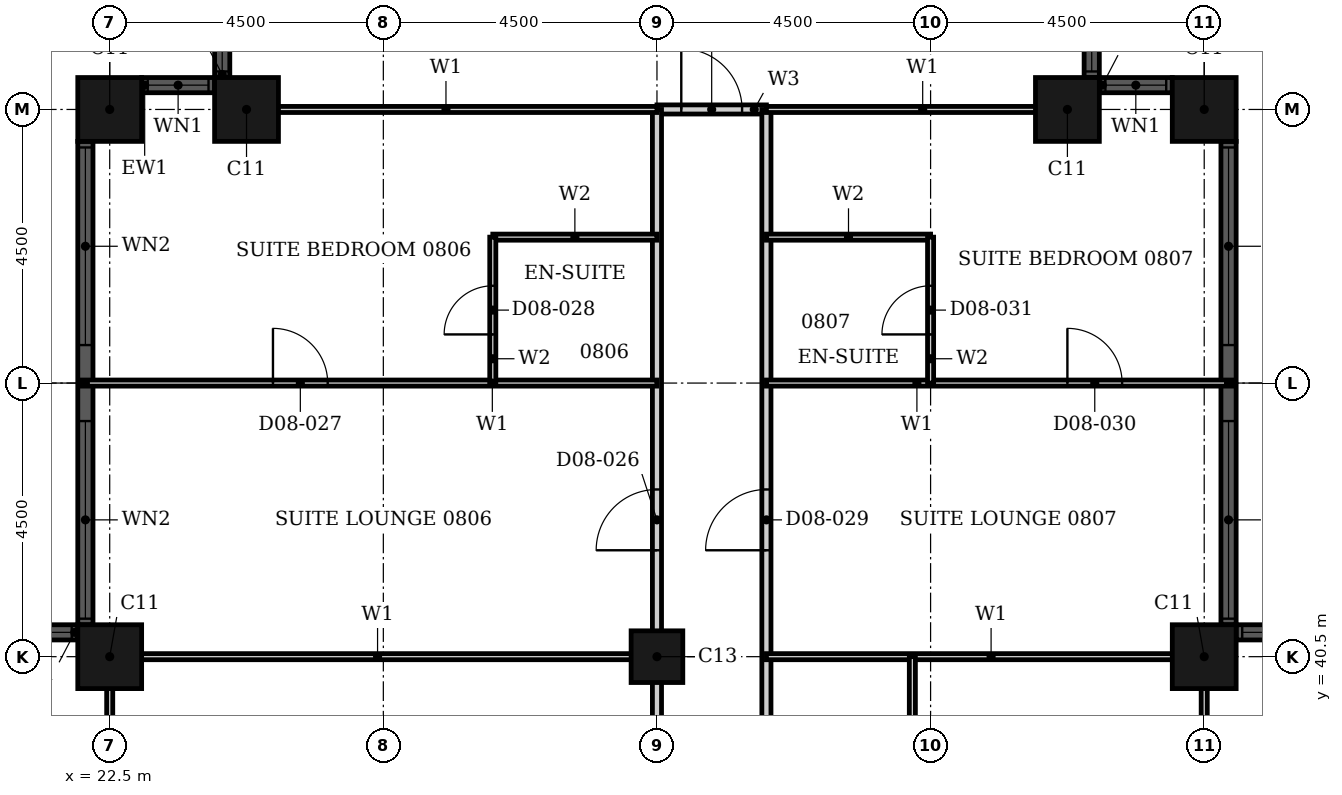
"""IFC4 building model, lengths in metres.
Left out: names, types, materials, properties, quantities, classifications, styles, units other than length and angle.
Written with IfcOpenShell. Run it as: python <this file> out.ifc"""

import sys

from ifc_helpers import new_model, si_unit, direction, frame, frame_2d, origin, origin_2d, place, context, subcontext, project, spatial, rectangle, hollow_rectangle, extrude, element, fill, save


model = new_model("IFC4")
c1 = context("Model", 3, precision=1e-05, world=origin(), true_north=direction((0.0, 1.0)))
c2 = subcontext(c1, "Body", "Model", "MODEL_VIEW")
j1 = project(units=[si_unit("LENGTHUNIT", "METRE"), si_unit("PLANEANGLEUNIT", "RADIAN")], contexts=[c1])
p1 = place(None, origin())
s1 = spatial("IfcSite", under=j1, at=p1, CompositionType="ELEMENT")
p2 = place(p1, origin())
s2 = spatial("IfcBuilding", under=s1, at=p2, CompositionType="ELEMENT")
p3 = place(p2, frame((0.0, 0.0, 40.8)))
s3 = spatial("IfcBuildingStorey", under=s2, at=p3, CompositionType="ELEMENT", Elevation=40.8)
for number, where, z_axis, x_axis in (
    (1, (40.5, 40.5, 0.0), (0.0, 0.0, 1.0), (1.0, 0.0, 0.0)),
    (2, (40.5, 49.5, 0.0), (0.0, 0.0, 1.0), (1.0, 0.0, 0.0)),
    (3, (38.25, 49.5, 0.0), (0.0, 0.0, 1.0), (1.0, 0.0, 0.0)),
    (4, (24.75, 49.5, 0.0), (0.0, 0.0, 1.0), (1.0, 0.0, 0.0)),
    (5, (22.5, 49.5, 0.0), (0.0, 0.0, 1.0), (1.0, 0.0, 0.0)),
    (6, (22.5, 40.5, 0.0), (0.0, 0.0, 1.0), (1.0, 0.0, 0.0)),
):
    element("IfcColumn", number, at=place(p3, frame(where, z_axis=z_axis, x_axis=x_axis)), inside=s3, PredefinedType="COLUMN", context=c2, shape_type="SweptSolid", body=[
        extrude(hollow_rectangle(XDim=1.05, YDim=1.05, WallThickness=0.034, at=origin_2d()), origin(), (0.0, 0.0, 1.0), 3.6),
    ])
p4 = place(p3, frame((31.5, 40.5, 0.0), z_axis=(0.0, 0.0, 1.0), x_axis=(1.0, 0.0, 0.0)))
e7 = element("IfcColumn", 7, at=p4, inside=s3, PredefinedType="COLUMN", context=c2, shape_type="SweptSolid", body=[
    extrude(hollow_rectangle(XDim=0.85, YDim=0.85, WallThickness=0.026, at=origin_2d()), origin(), (0.0, 0.0, 1.0), 3.6),
])
p5 = place(p3, frame((44.475, 40.9, 0.0), z_axis=(0.0, 0.0, 1.0), x_axis=(-1.0, 0.0, 0.0)))
e8 = element("IfcWall", 8, at=p5, inside=s3, PredefinedType="SOLIDWALL", context=c2, shape_type="SweptSolid", body=[
    extrude(rectangle(XDim=3.45, YDim=0.25, at=frame_2d((1.725, 0.0))), origin(), (0.0, 0.0, 1.0), 3.6),
])
p6 = place(p5, frame((0.1, 0.0, 0.9)))
e9 = element("IfcOpeningElement", 9, at=p6, cuts=e8, PredefinedType="OPENING", context=c2, shape_type="SweptSolid", body=[
    extrude(rectangle(XDim=3.25, YDim=2.08, at=frame_2d((1.625, 1.04))), frame((0.0, 0.135, 0.0), z_axis=(0.0, -1.0, 0.0), x_axis=(1.0, 0.0, 0.0)), (0.0, 0.0, 1.0), 0.27),
])
p7 = place(p3, frame((40.9, 41.025, 0.0), z_axis=(0.0, 0.0, 1.0), x_axis=(0.0, 1.0, 0.0)))
e10 = element("IfcWall", 10, at=p7, inside=s3, PredefinedType="SOLIDWALL", context=c2, shape_type="SweptSolid", body=[
    extrude(rectangle(XDim=7.95, YDim=0.25, at=frame_2d((3.975, 0.0))), origin(), (0.0, 0.0, 1.0), 3.6),
])
p8 = place(p7, frame((0.1, 0.0, 0.9)))
e11 = element("IfcOpeningElement", 11, at=p8, cuts=e10, PredefinedType="OPENING", context=c2, shape_type="SweptSolid", body=[
    extrude(rectangle(XDim=3.25, YDim=2.08, at=frame_2d((1.625, 1.04))), frame((0.0, 0.135, 0.0), z_axis=(0.0, -1.0, 0.0), x_axis=(1.0, 0.0, 0.0)), (0.0, 0.0, 1.0), 0.27),
])
p9 = place(p7, frame((4.6, 0.0, 0.9)))
e12 = element("IfcOpeningElement", 12, at=p9, cuts=e10, PredefinedType="OPENING", context=c2, shape_type="SweptSolid", body=[
    extrude(rectangle(XDim=3.25, YDim=2.08, at=frame_2d((1.625, 1.04))), frame((0.0, 0.135, 0.0), z_axis=(0.0, -1.0, 0.0), x_axis=(1.0, 0.0, 0.0)), (0.0, 0.0, 1.0), 0.27),
])
p10 = place(p3, frame((39.975, 49.9, 0.0), z_axis=(0.0, 0.0, 1.0), x_axis=(-1.0, 0.0, 0.0)))
e13 = element("IfcWall", 13, at=p10, inside=s3, PredefinedType="SOLIDWALL", context=c2, shape_type="SweptSolid", body=[
    extrude(rectangle(XDim=1.2, YDim=0.25, at=frame_2d((0.6, 0.0))), origin(), (0.0, 0.0, 1.0), 3.6),
])
p11 = place(p10, frame((0.1, 0.0, 0.9)))
e14 = element("IfcOpeningElement", 14, at=p11, cuts=e13, PredefinedType="OPENING", context=c2, shape_type="SweptSolid", body=[
    extrude(rectangle(XDim=1.0, YDim=2.08, at=frame_2d((0.5, 1.04))), frame((0.0, 0.135, 0.0), z_axis=(0.0, -1.0, 0.0), x_axis=(1.0, 0.0, 0.0)), (0.0, 0.0, 1.0), 0.27),
])
p12 = place(p3, frame((38.65, 50.025, 0.0), z_axis=(0.0, 0.0, 1.0), x_axis=(0.0, 1.0, 0.0)))
e15 = element("IfcWall", 15, at=p12, inside=s3, PredefinedType="SOLIDWALL", context=c2, shape_type="SweptSolid", body=[
    extrude(rectangle(XDim=1.2, YDim=0.25, at=frame_2d((0.6, 0.0))), origin(), (0.0, 0.0, 1.0), 3.6),
])
p13 = place(p12, frame((0.1, 0.0, 0.9)))
e16 = element("IfcOpeningElement", 16, at=p13, cuts=e15, PredefinedType="OPENING", context=c2, shape_type="SweptSolid", body=[
    extrude(rectangle(XDim=1.0, YDim=2.08, at=frame_2d((0.5, 1.04))), frame((0.0, 0.135, 0.0), z_axis=(0.0, -1.0, 0.0), x_axis=(1.0, 0.0, 0.0)), (0.0, 0.0, 1.0), 0.27),
])
p14 = place(p3, frame((24.35, 51.225, 0.0), z_axis=(0.0, 0.0, 1.0), x_axis=(0.0, -1.0, 0.0)))
e17 = element("IfcWall", 17, at=p14, inside=s3, PredefinedType="SOLIDWALL", context=c2, shape_type="SweptSolid", body=[
    extrude(rectangle(XDim=1.2, YDim=0.25, at=frame_2d((0.6, 0.0))), origin(), (0.0, 0.0, 1.0), 3.6),
])
p15 = place(p14, frame((0.1, 0.0, 0.9)))
e18 = element("IfcOpeningElement", 18, at=p15, cuts=e17, PredefinedType="OPENING", context=c2, shape_type="SweptSolid", body=[
    extrude(rectangle(XDim=1.0, YDim=2.08, at=frame_2d((0.5, 1.04))), frame((0.0, 0.135, 0.0), z_axis=(0.0, -1.0, 0.0), x_axis=(1.0, 0.0, 0.0)), (0.0, 0.0, 1.0), 0.27),
])
p16 = place(p3, frame((24.225, 49.9, 0.0), z_axis=(0.0, 0.0, 1.0), x_axis=(-1.0, 0.0, 0.0)))
e19 = element("IfcWall", 19, at=p16, inside=s3, PredefinedType="SOLIDWALL", context=c2, shape_type="SweptSolid", body=[
    extrude(rectangle(XDim=1.2, YDim=0.25, at=frame_2d((0.6, 0.0))), origin(), (0.0, 0.0, 1.0), 3.6),
])
p17 = place(p16, frame((0.1, 0.0, 0.9)))
e20 = element("IfcOpeningElement", 20, at=p17, cuts=e19, PredefinedType="OPENING", context=c2, shape_type="SweptSolid", body=[
    extrude(rectangle(XDim=1.0, YDim=2.08, at=frame_2d((0.5, 1.04))), frame((0.0, 0.135, 0.0), z_axis=(0.0, -1.0, 0.0), x_axis=(1.0, 0.0, 0.0)), (0.0, 0.0, 1.0), 0.27),
])
p18 = place(p3, frame((22.1, 48.975, 0.0), z_axis=(0.0, 0.0, 1.0), x_axis=(0.0, -1.0, 0.0)))
e21 = element("IfcWall", 21, at=p18, inside=s3, PredefinedType="SOLIDWALL", context=c2, shape_type="SweptSolid", body=[
    extrude(rectangle(XDim=7.95, YDim=0.25, at=frame_2d((3.975, 0.0))), origin(), (0.0, 0.0, 1.0), 3.6),
])
p19 = place(p18, frame((0.1, 0.0, 0.9)))
e22 = element("IfcOpeningElement", 22, at=p19, cuts=e21, PredefinedType="OPENING", context=c2, shape_type="SweptSolid", body=[
    extrude(rectangle(XDim=3.25, YDim=2.08, at=frame_2d((1.625, 1.04))), frame((0.0, 0.135, 0.0), z_axis=(0.0, -1.0, 0.0), x_axis=(1.0, 0.0, 0.0)), (0.0, 0.0, 1.0), 0.27),
])
p20 = place(p18, frame((4.6, 0.0, 0.9)))
e23 = element("IfcOpeningElement", 23, at=p20, cuts=e21, PredefinedType="OPENING", context=c2, shape_type="SweptSolid", body=[
    extrude(rectangle(XDim=3.25, YDim=2.08, at=frame_2d((1.625, 1.04))), frame((0.0, 0.135, 0.0), z_axis=(0.0, -1.0, 0.0), x_axis=(1.0, 0.0, 0.0)), (0.0, 0.0, 1.0), 0.27),
])
p21 = place(p3, frame((21.975, 40.9, 0.0), z_axis=(0.0, 0.0, 1.0), x_axis=(-1.0, 0.0, 0.0)))
e24 = element("IfcWall", 24, at=p21, inside=s3, PredefinedType="SOLIDWALL", context=c2, shape_type="SweptSolid", body=[
    extrude(rectangle(XDim=3.45, YDim=0.25, at=frame_2d((1.725, 0.0))), origin(), (0.0, 0.0, 1.0), 3.6),
])
p22 = place(p21, frame((0.1, 0.0, 0.9)))
e25 = element("IfcOpeningElement", 25, at=p22, cuts=e24, PredefinedType="OPENING", context=c2, shape_type="SweptSolid", body=[
    extrude(rectangle(XDim=3.25, YDim=2.08, at=frame_2d((1.625, 1.04))), frame((0.0, 0.135, 0.0), z_axis=(0.0, -1.0, 0.0), x_axis=(1.0, 0.0, 0.0)), (0.0, 0.0, 1.0), 0.27),
])
p23 = place(p3, frame((31.5, 49.5, 0.0), z_axis=(0.0, 0.0, 1.0), x_axis=(1.0, 0.0, 0.0)))
e26 = element("IfcWall", 26, at=p23, inside=s3, PredefinedType="PARTITIONING", context=c2, shape_type="SweptSolid", body=[
    extrude(rectangle(XDim=1.8, YDim=0.15, at=frame_2d((0.9, 0.0))), origin(), (0.0, 0.0, 1.0), 3.3),
])
p24 = place(p23, frame((0.4, 0.0, 0.0)))
e27 = element("IfcOpeningElement", 27, at=p24, cuts=e26, PredefinedType="OPENING", context=c2, shape_type="SweptSolid", body=[
    extrude(rectangle(XDim=1.0, YDim=2.1, at=frame_2d((0.5, 1.05))), frame((0.0, 0.085, 0.0), z_axis=(0.0, -1.0, 0.0), x_axis=(1.0, 0.0, 0.0)), (0.0, 0.0, 1.0), 0.17),
])
p25 = place(p3, frame((31.5, 33.3, 0.0), z_axis=(0.0, 0.0, 1.0), x_axis=(0.0, 1.0, 0.0)))
e28 = element("IfcWall", 28, at=p25, inside=s3, PredefinedType="PARTITIONING", context=c2, shape_type="SweptSolid", body=[
    extrude(rectangle(XDim=16.2, YDim=0.15, at=frame_2d((8.1, 0.0))), origin(), (0.0, 0.0, 1.0), 2.58),
])
p26 = place(p25, frame((8.95, 0.0, 0.0)))
e29 = element("IfcOpeningElement", 29, at=p26, cuts=e28, PredefinedType="OPENING", context=c2, shape_type="SweptSolid", body=[
    extrude(rectangle(XDim=1.0, YDim=2.1, at=frame_2d((0.5, 1.05))), frame((0.0, 0.085, 0.0), z_axis=(0.0, -1.0, 0.0), x_axis=(1.0, 0.0, 0.0)), (0.0, 0.0, 1.0), 0.17),
])
p27 = place(p3, frame((33.3, 33.3, 0.0), z_axis=(0.0, 0.0, 1.0), x_axis=(0.0, 1.0, 0.0)))
e30 = element("IfcWall", 30, at=p27, inside=s3, PredefinedType="PARTITIONING", context=c2, shape_type="SweptSolid", body=[
    extrude(rectangle(XDim=16.2, YDim=0.15, at=frame_2d((8.1, 0.0))), origin(), (0.0, 0.0, 1.0), 3.3),
])
p28 = place(p27, frame((8.95, 0.0, 0.0)))
e31 = element("IfcOpeningElement", 31, at=p28, cuts=e30, PredefinedType="OPENING", context=c2, shape_type="SweptSolid", body=[
    extrude(rectangle(XDim=1.0, YDim=2.1, at=frame_2d((0.5, 1.05))), frame((0.0, 0.085, 0.0), z_axis=(0.0, -1.0, 0.0), x_axis=(1.0, 0.0, 0.0)), (0.0, 0.0, 1.0), 0.17),
])
p29 = place(p3, frame((33.3, 40.5, 0.0), z_axis=(0.0, 0.0, 1.0), x_axis=(1.0, 0.0, 0.0)))
e32 = element("IfcWall", 32, at=p29, inside=s3, PredefinedType="PARTITIONING", context=c2, shape_type="SweptSolid", body=[
    extrude(rectangle(XDim=7.39, YDim=0.1, at=frame_2d((3.695, 0.0))), origin(), (0.0, 0.0, 1.0), 2.38),
])
p30 = place(p3, frame((22.31, 40.5, 0.0), z_axis=(0.0, 0.0, 1.0), x_axis=(1.0, 0.0, 0.0)))
e33 = element("IfcWall", 33, at=p30, inside=s3, PredefinedType="PARTITIONING", context=c2, shape_type="SweptSolid", body=[
    extrude(rectangle(XDim=9.19, YDim=0.1, at=frame_2d((4.595, 0.0))), origin(), (0.0, 0.0, 1.0), 2.38),
])
p31 = place(p3, frame((33.3, 45.0, 0.0), z_axis=(0.0, 0.0, 1.0), x_axis=(1.0, 0.0, 0.0)))
e34 = element("IfcWall", 34, at=p31, inside=s3, PredefinedType="PARTITIONING", context=c2, shape_type="SweptSolid", body=[
    extrude(rectangle(XDim=7.665, YDim=0.1, at=frame_2d((3.833, 0.0))), origin(), (0.0, 0.0, 1.0), 3.3),
])
p32 = place(p31, frame((4.95, 0.0, 0.0)))
e35 = element("IfcOpeningElement", 35, at=p32, cuts=e34, PredefinedType="OPENING", context=c2, shape_type="SweptSolid", body=[
    extrude(rectangle(XDim=0.9, YDim=2.1, at=frame_2d((0.45, 1.05))), frame((0.0, 0.06, 0.0), z_axis=(0.0, -1.0, 0.0), x_axis=(1.0, 0.0, 0.0)), (0.0, 0.0, 1.0), 0.12),
])
p33 = place(p3, frame((22.035, 45.0, 0.0), z_axis=(0.0, 0.0, 1.0), x_axis=(1.0, 0.0, 0.0)))
e36 = element("IfcWall", 36, at=p33, inside=s3, PredefinedType="PARTITIONING", context=c2, shape_type="SweptSolid", body=[
    extrude(rectangle(XDim=9.465, YDim=0.1, at=frame_2d((4.732, 0.0))), origin(), (0.0, 0.0, 1.0), 3.3),
])
p34 = place(p33, frame((3.15, 0.0, 0.0)))
e37 = element("IfcOpeningElement", 37, at=p34, cuts=e36, PredefinedType="OPENING", context=c2, shape_type="SweptSolid", body=[
    extrude(rectangle(XDim=0.9, YDim=2.1, at=frame_2d((0.45, 1.05))), frame((0.0, 0.06, 0.0), z_axis=(0.0, -1.0, 0.0), x_axis=(1.0, 0.0, 0.0)), (0.0, 0.0, 1.0), 0.12),
])
p35 = place(p3, frame((33.3, 49.5, 0.0), z_axis=(0.0, 0.0, 1.0), x_axis=(1.0, 0.0, 0.0)))
e38 = element("IfcWall", 38, at=p35, inside=s3, PredefinedType="PARTITIONING", context=c2, shape_type="SweptSolid", body=[
    extrude(rectangle(XDim=5.14, YDim=0.1, at=frame_2d((2.57, 0.0))), origin(), (0.0, 0.0, 1.0), 3.3),
])
p36 = place(p3, frame((24.56, 49.5, 0.0), z_axis=(0.0, 0.0, 1.0), x_axis=(1.0, 0.0, 0.0)))
e39 = element("IfcWall", 39, at=p36, inside=s3, PredefinedType="PARTITIONING", context=c2, shape_type="SweptSolid", body=[
    extrude(rectangle(XDim=6.94, YDim=0.1, at=frame_2d((3.47, 0.0))), origin(), (0.0, 0.0, 1.0), 3.3),
])
p37 = place(p3, frame((22.5, 33.3, 0.0), z_axis=(0.0, 0.0, 1.0), x_axis=(0.0, 1.0, 0.0)))
e40 = element("IfcWall", 40, at=p37, inside=s3, PredefinedType="PARTITIONING", context=c2, shape_type="SweptSolid", body=[
    extrude(rectangle(XDim=7.39, YDim=0.1, at=frame_2d((3.695, 0.0))), origin(), (0.0, 0.0, 1.0), 3.3),
])
p38 = place(p3, frame((35.7, 33.3, 0.0), z_axis=(0.0, 0.0, 1.0), x_axis=(0.0, 1.0, 0.0)))
e41 = element("IfcWall", 41, at=p38, inside=s3, PredefinedType="PARTITIONING", context=c2, shape_type="SweptSolid", body=[
    extrude(rectangle(XDim=7.2, YDim=0.1, at=frame_2d((3.6, 0.0))), origin(), (0.0, 0.0, 1.0), 3.3),
])
p39 = place(p3, frame((40.5, 33.3, 0.0), z_axis=(0.0, 0.0, 1.0), x_axis=(0.0, 1.0, 0.0)))
e42 = element("IfcWall", 42, at=p39, inside=s3, PredefinedType="PARTITIONING", context=c2, shape_type="SweptSolid", body=[
    extrude(rectangle(XDim=7.39, YDim=0.1, at=frame_2d((3.695, 0.0))), origin(), (0.0, 0.0, 1.0), 3.3),
])
for number, where, z_axis, x_axis in (
    (43, (33.3, 47.4, 0.0), (0.0, 0.0, 1.0), (1.0, 0.0, 0.0)),
    (44, (28.8, 47.4, 0.0), (0.0, 0.0, 1.0), (1.0, 0.0, 0.0)),
):
    element("IfcWall", number, at=place(p3, frame(where, z_axis=z_axis, x_axis=x_axis)), inside=s3, PredefinedType="PARTITIONING", context=c2, shape_type="SweptSolid", body=[
        extrude(rectangle(XDim=2.7, YDim=0.1, at=frame_2d((1.35, 0.0))), origin(), (0.0, 0.0, 1.0), 3.3),
    ])
p40 = place(p3, frame((28.8, 45.0, 0.0), z_axis=(0.0, 0.0, 1.0), x_axis=(0.0, 1.0, 0.0)))
e45 = element("IfcWall", 45, at=p40, inside=s3, PredefinedType="PARTITIONING", context=c2, shape_type="SweptSolid", body=[
    extrude(rectangle(XDim=2.4, YDim=0.1, at=frame_2d((1.2, 0.0))), origin(), (0.0, 0.0, 1.0), 3.3),
])
p41 = place(p40, frame((0.8, 0.0, 0.0)))
e46 = element("IfcOpeningElement", 46, at=p41, cuts=e45, PredefinedType="OPENING", context=c2, shape_type="SweptSolid", body=[
    extrude(rectangle(XDim=0.8, YDim=2.1, at=frame_2d((0.4, 1.05))), frame((0.0, 0.06, 0.0), z_axis=(0.0, -1.0, 0.0), x_axis=(1.0, 0.0, 0.0)), (0.0, 0.0, 1.0), 0.12),
])
p42 = place(p3, frame((36.0, 45.0, 0.0), z_axis=(0.0, 0.0, 1.0), x_axis=(0.0, 1.0, 0.0)))
e47 = element("IfcWall", 47, at=p42, inside=s3, PredefinedType="PARTITIONING", context=c2, shape_type="SweptSolid", body=[
    extrude(rectangle(XDim=2.4, YDim=0.1, at=frame_2d((1.2, 0.0))), origin(), (0.0, 0.0, 1.0), 2.58),
])
p43 = place(p42, frame((0.8, 0.0, 0.0)))
e48 = element("IfcOpeningElement", 48, at=p43, cuts=e47, PredefinedType="OPENING", context=c2, shape_type="SweptSolid", body=[
    extrude(rectangle(XDim=0.8, YDim=2.1, at=frame_2d((0.4, 1.05))), frame((0.0, 0.06, 0.0), z_axis=(0.0, -1.0, 0.0), x_axis=(1.0, 0.0, 0.0)), (0.0, 0.0, 1.0), 0.12),
])
p44 = place(p6, origin())
e49 = element("IfcWindow", 49, at=p44, inside=s3, PartitioningType="SINGLE_PANEL", PredefinedType="WINDOW", context=c2, shape_type="SweptSolid", body=[
    extrude(rectangle(XDim=3.25, YDim=2.08, at=frame_2d((1.625, 1.04))), frame((0.0, 0.03, 0.0), z_axis=(0.0, -1.0, 0.0), x_axis=(1.0, 0.0, 0.0)), (0.0, 0.0, 1.0), 0.06),
])
fill(e9, e49)
p45 = place(p8, origin())
e50 = element("IfcWindow", 50, at=p45, inside=s3, PartitioningType="SINGLE_PANEL", PredefinedType="WINDOW", context=c2, shape_type="SweptSolid", body=[
    extrude(rectangle(XDim=3.25, YDim=2.08, at=frame_2d((1.625, 1.04))), frame((0.0, 0.03, 0.0), z_axis=(0.0, -1.0, 0.0), x_axis=(1.0, 0.0, 0.0)), (0.0, 0.0, 1.0), 0.06),
])
fill(e11, e50)
p46 = place(p9, origin())
e51 = element("IfcWindow", 51, at=p46, inside=s3, PartitioningType="SINGLE_PANEL", PredefinedType="WINDOW", context=c2, shape_type="SweptSolid", body=[
    extrude(rectangle(XDim=3.25, YDim=2.08, at=frame_2d((1.625, 1.04))), frame((0.0, 0.03, 0.0), z_axis=(0.0, -1.0, 0.0), x_axis=(1.0, 0.0, 0.0)), (0.0, 0.0, 1.0), 0.06),
])
fill(e12, e51)
p47 = place(p11, origin())
e52 = element("IfcWindow", 52, at=p47, inside=s3, PartitioningType="SINGLE_PANEL", PredefinedType="WINDOW", context=c2, shape_type="SweptSolid", body=[
    extrude(rectangle(XDim=1.0, YDim=2.08, at=frame_2d((0.5, 1.04))), frame((0.0, 0.03, 0.0), z_axis=(0.0, -1.0, 0.0), x_axis=(1.0, 0.0, 0.0)), (0.0, 0.0, 1.0), 0.06),
])
fill(e14, e52)
p48 = place(p13, origin())
e53 = element("IfcWindow", 53, at=p48, inside=s3, PartitioningType="SINGLE_PANEL", PredefinedType="WINDOW", context=c2, shape_type="SweptSolid", body=[
    extrude(rectangle(XDim=1.0, YDim=2.08, at=frame_2d((0.5, 1.04))), frame((0.0, 0.03, 0.0), z_axis=(0.0, -1.0, 0.0), x_axis=(1.0, 0.0, 0.0)), (0.0, 0.0, 1.0), 0.06),
])
fill(e16, e53)
p49 = place(p15, origin())
e54 = element("IfcWindow", 54, at=p49, inside=s3, PartitioningType="SINGLE_PANEL", PredefinedType="WINDOW", context=c2, shape_type="SweptSolid", body=[
    extrude(rectangle(XDim=1.0, YDim=2.08, at=frame_2d((0.5, 1.04))), frame((0.0, 0.03, 0.0), z_axis=(0.0, -1.0, 0.0), x_axis=(1.0, 0.0, 0.0)), (0.0, 0.0, 1.0), 0.06),
])
fill(e18, e54)
p50 = place(p17, origin())
e55 = element("IfcWindow", 55, at=p50, inside=s3, PartitioningType="SINGLE_PANEL", PredefinedType="WINDOW", context=c2, shape_type="SweptSolid", body=[
    extrude(rectangle(XDim=1.0, YDim=2.08, at=frame_2d((0.5, 1.04))), frame((0.0, 0.03, 0.0), z_axis=(0.0, -1.0, 0.0), x_axis=(1.0, 0.0, 0.0)), (0.0, 0.0, 1.0), 0.06),
])
fill(e20, e55)
p51 = place(p19, origin())
e56 = element("IfcWindow", 56, at=p51, inside=s3, PartitioningType="SINGLE_PANEL", PredefinedType="WINDOW", context=c2, shape_type="SweptSolid", body=[
    extrude(rectangle(XDim=3.25, YDim=2.08, at=frame_2d((1.625, 1.04))), frame((0.0, 0.03, 0.0), z_axis=(0.0, -1.0, 0.0), x_axis=(1.0, 0.0, 0.0)), (0.0, 0.0, 1.0), 0.06),
])
fill(e22, e56)
p52 = place(p20, origin())
e57 = element("IfcWindow", 57, at=p52, inside=s3, PartitioningType="SINGLE_PANEL", PredefinedType="WINDOW", context=c2, shape_type="SweptSolid", body=[
    extrude(rectangle(XDim=3.25, YDim=2.08, at=frame_2d((1.625, 1.04))), frame((0.0, 0.03, 0.0), z_axis=(0.0, -1.0, 0.0), x_axis=(1.0, 0.0, 0.0)), (0.0, 0.0, 1.0), 0.06),
])
fill(e23, e57)
p53 = place(p22, origin())
e58 = element("IfcWindow", 58, at=p53, inside=s3, PartitioningType="SINGLE_PANEL", PredefinedType="WINDOW", context=c2, shape_type="SweptSolid", body=[
    extrude(rectangle(XDim=3.25, YDim=2.08, at=frame_2d((1.625, 1.04))), frame((0.0, 0.03, 0.0), z_axis=(0.0, -1.0, 0.0), x_axis=(1.0, 0.0, 0.0)), (0.0, 0.0, 1.0), 0.06),
])
fill(e25, e58)
p54 = place(p26, origin())
e59 = element("IfcDoor", 59, at=p54, inside=s3, OperationType="SINGLE_SWING_RIGHT", PredefinedType="DOOR", context=c2, shape_type="SweptSolid", body=[
    extrude(rectangle(XDim=1.0, YDim=2.1, at=frame_2d((0.5, 1.05))), frame((0.0, 0.025, 0.0), z_axis=(0.0, -1.0, 0.0), x_axis=(1.0, 0.0, 0.0)), (0.0, 0.0, 1.0), 0.05),
])
fill(e29, e59)
p55 = place(p34, origin())
e60 = element("IfcDoor", 60, at=p55, inside=s3, OperationType="SINGLE_SWING_LEFT", PredefinedType="DOOR", context=c2, shape_type="SweptSolid", body=[
    extrude(rectangle(XDim=0.9, YDim=2.1, at=frame_2d((0.45, 1.05))), frame((0.0, 0.025, 0.0), z_axis=(0.0, -1.0, 0.0), x_axis=(1.0, 0.0, 0.0)), (0.0, 0.0, 1.0), 0.05),
])
fill(e37, e60)
p56 = place(p41, origin())
e61 = element("IfcDoor", 61, at=p56, inside=s3, OperationType="SINGLE_SWING_RIGHT", PredefinedType="DOOR", context=c2, shape_type="SweptSolid", body=[
    extrude(rectangle(XDim=0.8, YDim=2.1, at=frame_2d((0.4, 1.05))), frame((0.0, 0.025, 0.0), z_axis=(0.0, -1.0, 0.0), x_axis=(1.0, 0.0, 0.0)), (0.0, 0.0, 1.0), 0.05),
])
fill(e46, e61)
p57 = place(p28, origin())
e62 = element("IfcDoor", 62, at=p57, inside=s3, OperationType="SINGLE_SWING_LEFT", PredefinedType="DOOR", context=c2, shape_type="SweptSolid", body=[
    extrude(rectangle(XDim=1.0, YDim=2.1, at=frame_2d((0.5, 1.05))), frame((0.0, 0.025, 0.0), z_axis=(0.0, -1.0, 0.0), x_axis=(1.0, 0.0, 0.0)), (0.0, 0.0, 1.0), 0.05),
])
fill(e31, e62)
p58 = place(p32, origin())
e63 = element("IfcDoor", 63, at=p58, inside=s3, OperationType="SINGLE_SWING_RIGHT", PredefinedType="DOOR", context=c2, shape_type="SweptSolid", body=[
    extrude(rectangle(XDim=0.9, YDim=2.1, at=frame_2d((0.45, 1.05))), frame((0.0, 0.025, 0.0), z_axis=(0.0, -1.0, 0.0), x_axis=(1.0, 0.0, 0.0)), (0.0, 0.0, 1.0), 0.05),
])
fill(e35, e63)
p59 = place(p43, origin())
e64 = element("IfcDoor", 64, at=p59, inside=s3, OperationType="SINGLE_SWING_RIGHT", PredefinedType="DOOR", context=c2, shape_type="SweptSolid", body=[
    extrude(rectangle(XDim=0.8, YDim=2.1, at=frame_2d((0.4, 1.05))), frame((0.0, 0.025, 0.0), z_axis=(0.0, -1.0, 0.0), x_axis=(1.0, 0.0, 0.0)), (0.0, 0.0, 1.0), 0.05),
])
fill(e48, e64)
p60 = place(p24, origin())
e65 = element("IfcDoor", 65, at=p60, inside=s3, OperationType="SINGLE_SWING_LEFT", PredefinedType="DOOR", context=c2, shape_type="SweptSolid", body=[
    extrude(rectangle(XDim=1.0, YDim=2.1, at=frame_2d((0.5, 1.05))), frame((0.0, 0.025, 0.0), z_axis=(0.0, -1.0, 0.0), x_axis=(1.0, 0.0, 0.0)), (0.0, 0.0, 1.0), 0.05),
])
fill(e27, e65)
save(model, sys.argv[1])
